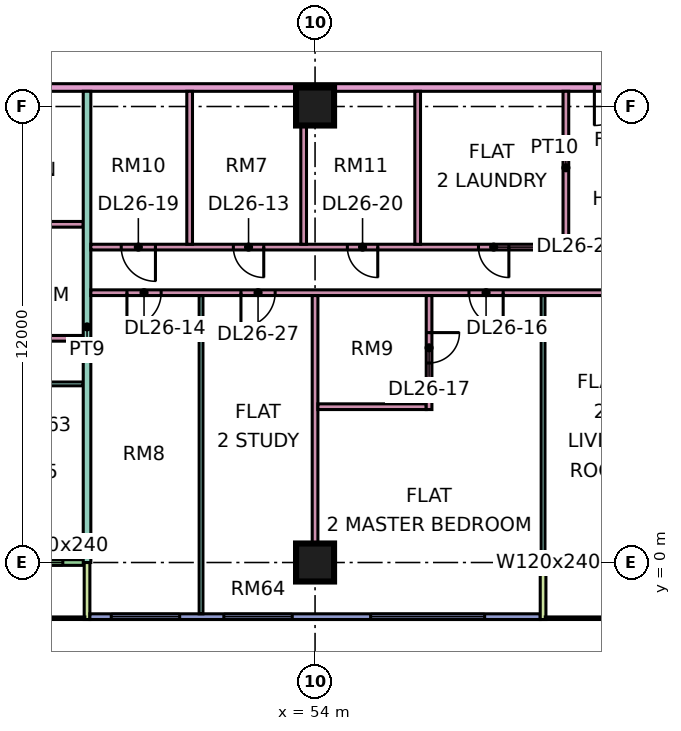
"""IFC4 building model, lengths in metres.
Left out: names, types, materials, properties, quantities, classifications, styles, units other than length and angle.
Written with IfcOpenShell. Run it as: python <this file> out.ifc"""

import sys

from ifc_helpers import new_model, si_unit, direction, frame, frame_2d, origin, origin_2d, place, context, subcontext, project, spatial, rectangle, extrude, element, fill, save


model = new_model("IFC4")
c1 = context("Model", 3, precision=1e-05, world=origin(), true_north=direction((0.0, 1.0)))
c2 = subcontext(c1, "Body", "Model", "MODEL_VIEW")
j1 = project(units=[si_unit("LENGTHUNIT", "METRE"), si_unit("PLANEANGLEUNIT", "RADIAN")], contexts=[c1])
p1 = place(None, origin())
s1 = spatial("IfcSite", under=j1, at=p1, CompositionType="ELEMENT")
p2 = place(p1, origin())
s2 = spatial("IfcBuilding", under=s1, at=p2, CompositionType="ELEMENT")
p3 = place(p2, frame((0.0, 0.0, 114.4)))
s3 = spatial("IfcBuildingStorey", under=s2, at=p3, CompositionType="ELEMENT", Elevation=114.4)
for number, where, z_axis, x_axis in (
    (1, (54.0, 0.0, 0.0), (0.0, 0.0, 1.0), (1.0, 0.0, 0.0)),
    (2, (54.0, 12.0, 0.0), (0.0, 0.0, 1.0), (1.0, 0.0, 0.0)),
):
    element("IfcColumn", number, at=place(p3, frame(where, z_axis=z_axis, x_axis=x_axis)), inside=s3, PredefinedType="COLUMN", context=c2, shape_type="SweptSolid", body=[
        extrude(rectangle(XDim=1.0, YDim=1.0, at=origin_2d()), origin(), (0.0, 0.0, 1.0), 3.75),
    ])
p4 = place(p3, frame((36.075, 0.0, 0.0), z_axis=(0.0, 0.0, 1.0), x_axis=(1.0, 0.0, 0.0)))
e3 = element("IfcWall", 3, at=p4, inside=s3, PredefinedType="SOLIDWALL", context=c2, shape_type="SweptSolid", body=[
    extrude(rectangle(XDim=11.85, YDim=0.15, at=frame_2d((5.925, 0.0))), origin(), (0.0, 0.0, 1.0), 3.35),
])
p5 = place(p4, frame((3.525, 0.0, 0.0)))
e4 = element("IfcOpeningElement", 4, at=p5, cuts=e3, PredefinedType="OPENING", context=c2, shape_type="SweptSolid", body=[
    extrude(rectangle(XDim=1.8, YDim=2.4, at=frame_2d((0.9, 1.2))), frame((0.0, 0.085, 0.0), z_axis=(0.0, -1.0, 0.0), x_axis=(1.0, 0.0, 0.0)), (0.0, 0.0, 1.0), 0.17),
])
p6 = place(p4, frame((10.087, 0.0, 0.45)))
e5 = element("IfcOpeningElement", 5, at=p6, cuts=e3, PredefinedType="OPENING", context=c2, shape_type="SweptSolid", body=[
    extrude(rectangle(XDim=1.2, YDim=2.4, at=frame_2d((0.6, 1.2))), frame((0.0, 0.085, 0.0), z_axis=(0.0, -1.0, 0.0), x_axis=(1.0, 0.0, 0.0)), (0.0, 0.0, 1.0), 0.17),
])
p7 = place(p3, frame((48.0, -1.5, 0.0), z_axis=(0.0, 0.0, 1.0), x_axis=(0.0, 1.0, 0.0)))
e6 = element("IfcWall", 6, at=p7, inside=s3, PredefinedType="SOLIDWALL", context=c2, shape_type="SweptSolid", body=[
    extrude(rectangle(XDim=1.5, YDim=0.15, at=frame_2d((0.75, 0.0))), origin(), (0.0, 0.0, 1.0), 3.35),
])
p8 = place(p3, frame((48.075, -1.425, 0.0), z_axis=(0.0, 0.0, 1.0), x_axis=(1.0, 0.0, 0.0)))
e7 = element("IfcWall", 7, at=p8, inside=s3, PredefinedType="SOLIDWALL", context=c2, shape_type="SweptSolid", body=[
    extrude(rectangle(XDim=11.85, YDim=0.15, at=frame_2d((5.925, 0.0))), origin(), (0.0, 0.0, 1.0), 3.35),
])
p9 = place(p8, frame((0.562, 0.0, 0.45)))
e8 = element("IfcOpeningElement", 8, at=p9, cuts=e7, PredefinedType="OPENING", context=c2, shape_type="SweptSolid", body=[
    extrude(rectangle(XDim=1.8, YDim=2.4, at=frame_2d((0.9, 1.2))), frame((0.0, 0.085, 0.0), z_axis=(0.0, -1.0, 0.0), x_axis=(1.0, 0.0, 0.0)), (0.0, 0.0, 1.0), 0.17),
])
p10 = place(p8, frame((3.525, 0.0, 0.45)))
e9 = element("IfcOpeningElement", 9, at=p10, cuts=e7, PredefinedType="OPENING", context=c2, shape_type="SweptSolid", body=[
    extrude(rectangle(XDim=1.8, YDim=2.4, at=frame_2d((0.9, 1.2))), frame((0.0, 0.085, 0.0), z_axis=(0.0, -1.0, 0.0), x_axis=(1.0, 0.0, 0.0)), (0.0, 0.0, 1.0), 0.17),
])
p11 = place(p8, frame((7.387, 0.0, 0.45)))
e10 = element("IfcOpeningElement", 10, at=p11, cuts=e7, PredefinedType="OPENING", context=c2, shape_type="SweptSolid", body=[
    extrude(rectangle(XDim=3.0, YDim=2.4, at=frame_2d((1.5, 1.2))), frame((0.0, 0.085, 0.0), z_axis=(0.0, -1.0, 0.0), x_axis=(1.0, 0.0, 0.0)), (0.0, 0.0, 1.0), 0.17),
])
p12 = place(p3, frame((60.075, 0.0, 0.0), z_axis=(0.0, 0.0, 1.0), x_axis=(1.0, 0.0, 0.0)))
e11 = element("IfcWall", 11, at=p12, inside=s3, PredefinedType="SOLIDWALL", context=c2, shape_type="SweptSolid", body=[
    extrude(rectangle(XDim=10.35, YDim=0.15, at=frame_2d((5.175, 0.0))), origin(), (0.0, 0.0, 1.0), 3.35),
])
p13 = place(p12, frame((0.562, 0.0, 0.45)))
e12 = element("IfcOpeningElement", 12, at=p13, cuts=e11, PredefinedType="OPENING", context=c2, shape_type="SweptSolid", body=[
    extrude(rectangle(XDim=1.2, YDim=2.4, at=frame_2d((0.6, 1.2))), frame((0.0, 0.085, 0.0), z_axis=(0.0, -1.0, 0.0), x_axis=(1.0, 0.0, 0.0)), (0.0, 0.0, 1.0), 0.17),
])
p14 = place(p12, frame((4.125, 0.0, 0.0)))
e13 = element("IfcOpeningElement", 13, at=p14, cuts=e11, PredefinedType="OPENING", context=c2, shape_type="SweptSolid", body=[
    extrude(rectangle(XDim=1.2, YDim=2.4, at=frame_2d((0.6, 1.2))), frame((0.0, 0.085, 0.0), z_axis=(0.0, -1.0, 0.0), x_axis=(1.0, 0.0, 0.0)), (0.0, 0.0, 1.0), 0.17),
])
p15 = place(p12, frame((6.525, 0.0, 0.45)))
e14 = element("IfcOpeningElement", 14, at=p15, cuts=e11, PredefinedType="OPENING", context=c2, shape_type="SweptSolid", body=[
    extrude(rectangle(XDim=1.8, YDim=2.4, at=frame_2d((0.9, 1.2))), frame((0.0, 0.085, 0.0), z_axis=(0.0, -1.0, 0.0), x_axis=(1.0, 0.0, 0.0)), (0.0, 0.0, 1.0), 0.17),
])
p16 = place(p12, frame((9.188, 0.0, 0.45)))
e15 = element("IfcOpeningElement", 15, at=p16, cuts=e11, PredefinedType="OPENING", context=c2, shape_type="SweptSolid", body=[
    extrude(rectangle(XDim=0.9, YDim=2.4, at=frame_2d((0.45, 1.2))), frame((0.0, 0.085, 0.0), z_axis=(0.0, -1.0, 0.0), x_axis=(1.0, 0.0, 0.0)), (0.0, 0.0, 1.0), 0.17),
])
p17 = place(p3, frame((60.0, -1.5, 0.0), z_axis=(0.0, 0.0, 1.0), x_axis=(0.0, 1.0, 0.0)))
e16 = element("IfcWall", 16, at=p17, inside=s3, PredefinedType="SOLIDWALL", context=c2, shape_type="SweptSolid", body=[
    extrude(rectangle(XDim=1.5, YDim=0.15, at=frame_2d((0.75, 0.0))), origin(), (0.0, 0.0, 1.0), 3.35),
])
p18 = place(p3, frame((33.05, 4.7, 0.0), z_axis=(0.0, 0.0, 1.0), x_axis=(1.0, 0.0, 0.0)))
e17 = element("IfcWall", 17, at=p18, inside=s3, PredefinedType="PARTITIONING", context=c2, shape_type="SweptSolid", body=[
    extrude(rectangle(XDim=14.85, YDim=0.1, at=frame_2d((7.425, 0.0))), origin(), (0.0, 0.0, 1.0), 3.35),
])
p19 = place(p18, frame((1.0, 0.0, 0.0)))
e18 = element("IfcOpeningElement", 18, at=p19, cuts=e17, PredefinedType="OPENING", context=c2, shape_type="SweptSolid", body=[
    extrude(rectangle(XDim=0.9, YDim=2.1, at=frame_2d((0.45, 1.05))), frame((0.0, 0.06, 0.0), z_axis=(0.0, -1.0, 0.0), x_axis=(1.0, 0.0, 0.0)), (0.0, 0.0, 1.0), 0.12),
])
p20 = place(p18, frame((13.0, 0.0, 0.0)))
e19 = element("IfcOpeningElement", 19, at=p20, cuts=e17, PredefinedType="OPENING", context=c2, shape_type="SweptSolid", body=[
    extrude(rectangle(XDim=0.9, YDim=2.1, at=frame_2d((0.45, 1.05))), frame((0.0, 0.06, 0.0), z_axis=(0.0, -1.0, 0.0), x_axis=(1.0, 0.0, 0.0)), (0.0, 0.0, 1.0), 0.12),
])
p21 = place(p18, frame((7.0, 0.0, 0.0)))
e20 = element("IfcOpeningElement", 20, at=p21, cuts=e17, PredefinedType="OPENING", context=c2, shape_type="SweptSolid", body=[
    extrude(rectangle(XDim=0.9, YDim=2.1, at=frame_2d((0.45, 1.05))), frame((0.0, 0.06, 0.0), z_axis=(0.0, -1.0, 0.0), x_axis=(1.0, 0.0, 0.0)), (0.0, 0.0, 1.0), 0.12),
])
p22 = place(p3, frame((40.65, 12.5, 0.0), z_axis=(0.0, 0.0, 1.0), x_axis=(1.0, 0.0, 0.0)))
e21 = element("IfcWall", 21, at=p22, inside=s3, PredefinedType="PARTITIONING", context=c2, shape_type="SweptSolid", body=[
    extrude(rectangle(XDim=31.276, YDim=0.2, at=frame_2d((15.638, 0.0))), origin(), (0.0, 0.0, 1.0), 3.35),
])
p23 = place(p22, frame((20.7, 0.0, 0.0)))
e22 = element("IfcOpeningElement", 22, at=p23, cuts=e21, PredefinedType="OPENING", context=c2, shape_type="SweptSolid", body=[
    extrude(rectangle(XDim=1.0, YDim=2.1, at=frame_2d((0.5, 1.05))), frame((0.0, 0.11, 0.0), z_axis=(0.0, -1.0, 0.0), x_axis=(1.0, 0.0, 0.0)), (0.0, 0.0, 1.0), 0.22),
])
p24 = place(p22, frame((1.05, 0.0, 0.0)))
e23 = element("IfcOpeningElement", 23, at=p24, cuts=e21, PredefinedType="OPENING", context=c2, shape_type="SweptSolid", body=[
    extrude(rectangle(XDim=1.0, YDim=2.1, at=frame_2d((0.5, 1.05))), frame((0.0, 0.11, 0.0), z_axis=(0.0, -1.0, 0.0), x_axis=(1.0, 0.0, 0.0)), (0.0, 0.0, 1.0), 0.22),
])
p25 = place(p3, frame((43.725, 5.9, 0.0), z_axis=(0.0, 0.0, 1.0), x_axis=(1.0, 0.0, 0.0)))
e24 = element("IfcWall", 24, at=p25, inside=s3, PredefinedType="PARTITIONING", context=c2, shape_type="SweptSolid", body=[
    extrude(rectangle(XDim=4.175, YDim=0.15, at=frame_2d((2.087, 0.0))), origin(), (0.0, 0.0, 1.0), 3.35),
])
p26 = place(p25, frame((1.675, 0.0, 0.0)))
e25 = element("IfcOpeningElement", 25, at=p26, cuts=e24, PredefinedType="OPENING", context=c2, shape_type="SweptSolid", body=[
    extrude(rectangle(XDim=0.8, YDim=2.1, at=frame_2d((0.4, 1.05))), frame((0.0, 0.085, 0.0), z_axis=(0.0, -1.0, 0.0), x_axis=(1.0, 0.0, 0.0)), (0.0, 0.0, 1.0), 0.17),
])
p27 = place(p3, frame((43.725, 8.9, 0.0), z_axis=(0.0, 0.0, 1.0), x_axis=(1.0, 0.0, 0.0)))
e26 = element("IfcWall", 26, at=p27, inside=s3, PredefinedType="PARTITIONING", context=c2, shape_type="SweptSolid", body=[
    extrude(rectangle(XDim=4.175, YDim=0.15, at=frame_2d((2.087, 0.0))), origin(), (0.0, 0.0, 1.0), 3.35),
])
p28 = place(p3, frame((48.0, 0.0, 0.0), z_axis=(0.0, 0.0, 1.0), x_axis=(0.0, 1.0, 0.0)))
e27 = element("IfcWall", 27, at=p28, inside=s3, PredefinedType="PARTITIONING", context=c2, shape_type="SweptSolid", body=[
    extrude(rectangle(XDim=12.4, YDim=0.2, at=frame_2d((6.2, 0.0))), origin(), (0.0, 0.0, 1.0), 3.35),
])
p29 = place(p3, frame((48.1, 7.1, 0.0), z_axis=(0.0, 0.0, 1.0), x_axis=(1.0, 0.0, 0.0)))
e28 = element("IfcWall", 28, at=p29, inside=s3, PredefinedType="PARTITIONING", context=c2, shape_type="SweptSolid", body=[
    extrude(rectangle(XDim=25.25, YDim=0.15, at=frame_2d((12.625, 0.0))), origin(), (0.0, 0.0, 1.0), 3.35),
])
p30 = place(p29, frame((0.95, 0.0, 0.0)))
e29 = element("IfcOpeningElement", 29, at=p30, cuts=e28, PredefinedType="OPENING", context=c2, shape_type="SweptSolid", body=[
    extrude(rectangle(XDim=0.9, YDim=2.1, at=frame_2d((0.45, 1.05))), frame((0.0, 0.085, 0.0), z_axis=(0.0, -1.0, 0.0), x_axis=(1.0, 0.0, 0.0)), (0.0, 0.0, 1.0), 0.17),
])
p31 = place(p29, frame((21.95, 0.0, 0.0)))
e30 = element("IfcOpeningElement", 30, at=p31, cuts=e28, PredefinedType="OPENING", context=c2, shape_type="SweptSolid", body=[
    extrude(rectangle(XDim=0.9, YDim=2.1, at=frame_2d((0.45, 1.05))), frame((0.0, 0.085, 0.0), z_axis=(0.0, -1.0, 0.0), x_axis=(1.0, 0.0, 0.0)), (0.0, 0.0, 1.0), 0.17),
])
p32 = place(p29, frame((9.95, 0.0, 0.0)))
e31 = element("IfcOpeningElement", 31, at=p32, cuts=e28, PredefinedType="OPENING", context=c2, shape_type="SweptSolid", body=[
    extrude(rectangle(XDim=0.9, YDim=2.1, at=frame_2d((0.45, 1.05))), frame((0.0, 0.085, 0.0), z_axis=(0.0, -1.0, 0.0), x_axis=(1.0, 0.0, 0.0)), (0.0, 0.0, 1.0), 0.17),
])
p33 = place(p29, frame((14.45, 0.0, 0.0)))
e32 = element("IfcOpeningElement", 32, at=p33, cuts=e28, PredefinedType="OPENING", context=c2, shape_type="SweptSolid", body=[
    extrude(rectangle(XDim=0.9, YDim=2.1, at=frame_2d((0.45, 1.05))), frame((0.0, 0.085, 0.0), z_axis=(0.0, -1.0, 0.0), x_axis=(1.0, 0.0, 0.0)), (0.0, 0.0, 1.0), 0.17),
])
p34 = place(p29, frame((19.8, 0.0, 0.0)))
e33 = element("IfcOpeningElement", 33, at=p34, cuts=e28, PredefinedType="OPENING", context=c2, shape_type="SweptSolid", body=[
    extrude(rectangle(XDim=0.8, YDim=2.1, at=frame_2d((0.4, 1.05))), frame((0.0, 0.085, 0.0), z_axis=(0.0, -1.0, 0.0), x_axis=(1.0, 0.0, 0.0)), (0.0, 0.0, 1.0), 0.17),
])
p35 = place(p29, frame((3.95, 0.0, 0.0)))
e34 = element("IfcOpeningElement", 34, at=p35, cuts=e28, PredefinedType="OPENING", context=c2, shape_type="SweptSolid", body=[
    extrude(rectangle(XDim=0.9, YDim=2.1, at=frame_2d((0.45, 1.05))), frame((0.0, 0.085, 0.0), z_axis=(0.0, -1.0, 0.0), x_axis=(1.0, 0.0, 0.0)), (0.0, 0.0, 1.0), 0.17),
])
p36 = place(p3, frame((48.1, 8.3, 0.0), z_axis=(0.0, 0.0, 1.0), x_axis=(1.0, 0.0, 0.0)))
e35 = element("IfcWall", 35, at=p36, inside=s3, PredefinedType="PARTITIONING", context=c2, shape_type="SweptSolid", body=[
    extrude(rectangle(XDim=12.575, YDim=0.15, at=frame_2d((6.288, 0.0))), origin(), (0.0, 0.0, 1.0), 3.35),
])
p37 = place(p36, frame((3.75, 0.0, 0.0)))
e36 = element("IfcOpeningElement", 36, at=p37, cuts=e35, PredefinedType="OPENING", context=c2, shape_type="SweptSolid", body=[
    extrude(rectangle(XDim=0.8, YDim=2.1, at=frame_2d((0.4, 1.05))), frame((0.0, 0.085, 0.0), z_axis=(0.0, -1.0, 0.0), x_axis=(1.0, 0.0, 0.0)), (0.0, 0.0, 1.0), 0.17),
])
p38 = place(p36, frame((0.8, 0.0, 0.0)))
e37 = element("IfcOpeningElement", 37, at=p38, cuts=e35, PredefinedType="OPENING", context=c2, shape_type="SweptSolid", body=[
    extrude(rectangle(XDim=0.9, YDim=2.1, at=frame_2d((0.45, 1.05))), frame((0.0, 0.085, 0.0), z_axis=(0.0, -1.0, 0.0), x_axis=(1.0, 0.0, 0.0)), (0.0, 0.0, 1.0), 0.17),
])
p39 = place(p36, frame((6.75, 0.0, 0.0)))
e38 = element("IfcOpeningElement", 38, at=p39, cuts=e35, PredefinedType="OPENING", context=c2, shape_type="SweptSolid", body=[
    extrude(rectangle(XDim=0.8, YDim=2.1, at=frame_2d((0.4, 1.05))), frame((0.0, 0.085, 0.0), z_axis=(0.0, -1.0, 0.0), x_axis=(1.0, 0.0, 0.0)), (0.0, 0.0, 1.0), 0.17),
])
p40 = place(p36, frame((10.2, 0.0, 0.0)))
e39 = element("IfcOpeningElement", 39, at=p40, cuts=e35, PredefinedType="OPENING", context=c2, shape_type="SweptSolid", body=[
    extrude(rectangle(XDim=0.8, YDim=2.1, at=frame_2d((0.4, 1.05))), frame((0.0, 0.085, 0.0), z_axis=(0.0, -1.0, 0.0), x_axis=(1.0, 0.0, 0.0)), (0.0, 0.0, 1.0), 0.17),
])
p41 = place(p3, frame((50.7, 8.375, 0.0), z_axis=(0.0, 0.0, 1.0), x_axis=(0.0, 1.0, 0.0)))
e40 = element("IfcWall", 40, at=p41, inside=s3, PredefinedType="PARTITIONING", context=c2, shape_type="SweptSolid", body=[
    extrude(rectangle(XDim=4.025, YDim=0.15, at=frame_2d((2.012, 0.0))), origin(), (0.0, 0.0, 1.0), 3.35),
])
p42 = place(p3, frame((51.0, -1.35, 0.0), z_axis=(0.0, 0.0, 1.0), x_axis=(0.0, 1.0, 0.0)))
e41 = element("IfcWall", 41, at=p42, inside=s3, PredefinedType="PARTITIONING", context=c2, shape_type="SweptSolid", body=[
    extrude(rectangle(XDim=8.375, YDim=0.1, at=frame_2d((4.188, 0.0))), origin(), (0.0, 0.0, 1.0), 3.35),
])
p43 = place(p3, frame((53.7, 8.375, 0.0), z_axis=(0.0, 0.0, 1.0), x_axis=(0.0, 1.0, 0.0)))
e42 = element("IfcWall", 42, at=p43, inside=s3, PredefinedType="PARTITIONING", context=c2, shape_type="SweptSolid", body=[
    extrude(rectangle(XDim=4.025, YDim=0.15, at=frame_2d((2.012, 0.0))), origin(), (0.0, 0.0, 1.0), 3.35),
])
p44 = place(p3, frame((54.0, 0.0, 0.0), z_axis=(0.0, 0.0, 1.0), x_axis=(0.0, 1.0, 0.0)))
e43 = element("IfcWall", 43, at=p44, inside=s3, PredefinedType="PARTITIONING", context=c2, shape_type="SweptSolid", body=[
    extrude(rectangle(XDim=7.025, YDim=0.15, at=frame_2d((3.512, 0.0))), origin(), (0.0, 0.0, 1.0), 3.35),
])
p45 = place(p3, frame((54.075, 4.1, 0.0), z_axis=(0.0, 0.0, 1.0), x_axis=(1.0, 0.0, 0.0)))
e44 = element("IfcWall", 44, at=p45, inside=s3, PredefinedType="PARTITIONING", context=c2, shape_type="SweptSolid", body=[
    extrude(rectangle(XDim=2.85, YDim=0.15, at=frame_2d((1.425, 0.0))), origin(), (0.0, 0.0, 1.0), 3.35),
])
p46 = place(p3, frame((56.7, 8.375, 0.0), z_axis=(0.0, 0.0, 1.0), x_axis=(0.0, 1.0, 0.0)))
e45 = element("IfcWall", 45, at=p46, inside=s3, PredefinedType="PARTITIONING", context=c2, shape_type="SweptSolid", body=[
    extrude(rectangle(XDim=4.025, YDim=0.15, at=frame_2d((2.012, 0.0))), origin(), (0.0, 0.0, 1.0), 3.35),
])
p47 = place(p3, frame((57.0, 4.025, 0.0), z_axis=(0.0, 0.0, 1.0), x_axis=(0.0, 1.0, 0.0)))
e46 = element("IfcWall", 46, at=p47, inside=s3, PredefinedType="PARTITIONING", context=c2, shape_type="SweptSolid", body=[
    extrude(rectangle(XDim=3.0, YDim=0.15, at=frame_2d((1.5, 0.0))), origin(), (0.0, 0.0, 1.0), 3.35),
])
p48 = place(p47, frame((1.225, 0.0, 0.0)))
e47 = element("IfcOpeningElement", 47, at=p48, cuts=e46, PredefinedType="OPENING", context=c2, shape_type="SweptSolid", body=[
    extrude(rectangle(XDim=0.8, YDim=2.1, at=frame_2d((0.4, 1.05))), frame((0.0, 0.085, 0.0), z_axis=(0.0, -1.0, 0.0), x_axis=(1.0, 0.0, 0.0)), (0.0, 0.0, 1.0), 0.17),
])
p49 = place(p3, frame((60.0, 0.0, 0.0), z_axis=(0.0, 0.0, 1.0), x_axis=(0.0, 1.0, 0.0)))
e48 = element("IfcWall", 48, at=p49, inside=s3, PredefinedType="PARTITIONING", context=c2, shape_type="SweptSolid", body=[
    extrude(rectangle(XDim=7.025, YDim=0.1, at=frame_2d((3.512, 0.0))), origin(), (0.0, 0.0, 1.0), 3.35),
])
p50 = place(p3, frame((60.6, 8.375, 0.0), z_axis=(0.0, 0.0, 1.0), x_axis=(0.0, 1.0, 0.0)))
e49 = element("IfcWall", 49, at=p50, inside=s3, PredefinedType="PARTITIONING", context=c2, shape_type="SweptSolid", body=[
    extrude(rectangle(XDim=4.025, YDim=0.15, at=frame_2d((2.012, 0.0))), origin(), (0.0, 0.0, 1.0), 3.35),
])
p51 = place(p6, origin())
e50 = element("IfcWindow", 50, at=p51, inside=s3, PartitioningType="SINGLE_PANEL", PredefinedType="WINDOW", context=c2, shape_type="SweptSolid", body=[
    extrude(rectangle(XDim=1.2, YDim=2.4, at=frame_2d((0.6, 1.2))), frame((0.0, 0.03, 0.0), z_axis=(0.0, -1.0, 0.0), x_axis=(1.0, 0.0, 0.0)), (0.0, 0.0, 1.0), 0.06),
])
fill(e5, e50)
p52 = place(p9, origin())
e51 = element("IfcWindow", 51, at=p52, inside=s3, PartitioningType="SINGLE_PANEL", PredefinedType="WINDOW", context=c2, shape_type="SweptSolid", body=[
    extrude(rectangle(XDim=1.8, YDim=2.4, at=frame_2d((0.9, 1.2))), frame((0.0, 0.03, 0.0), z_axis=(0.0, -1.0, 0.0), x_axis=(1.0, 0.0, 0.0)), (0.0, 0.0, 1.0), 0.06),
])
fill(e8, e51)
p53 = place(p10, origin())
e52 = element("IfcWindow", 52, at=p53, inside=s3, PartitioningType="SINGLE_PANEL", PredefinedType="WINDOW", context=c2, shape_type="SweptSolid", body=[
    extrude(rectangle(XDim=1.8, YDim=2.4, at=frame_2d((0.9, 1.2))), frame((0.0, 0.03, 0.0), z_axis=(0.0, -1.0, 0.0), x_axis=(1.0, 0.0, 0.0)), (0.0, 0.0, 1.0), 0.06),
])
fill(e9, e52)
p54 = place(p11, origin())
e53 = element("IfcWindow", 53, at=p54, inside=s3, PartitioningType="SINGLE_PANEL", PredefinedType="WINDOW", context=c2, shape_type="SweptSolid", body=[
    extrude(rectangle(XDim=3.0, YDim=2.4, at=frame_2d((1.5, 1.2))), frame((0.0, 0.03, 0.0), z_axis=(0.0, -1.0, 0.0), x_axis=(1.0, 0.0, 0.0)), (0.0, 0.0, 1.0), 0.06),
])
fill(e10, e53)
p55 = place(p13, origin())
e54 = element("IfcWindow", 54, at=p55, inside=s3, PartitioningType="SINGLE_PANEL", PredefinedType="WINDOW", context=c2, shape_type="SweptSolid", body=[
    extrude(rectangle(XDim=1.2, YDim=2.4, at=frame_2d((0.6, 1.2))), frame((0.0, 0.03, 0.0), z_axis=(0.0, -1.0, 0.0), x_axis=(1.0, 0.0, 0.0)), (0.0, 0.0, 1.0), 0.06),
])
fill(e12, e54)
p56 = place(p37, origin())
e55 = element("IfcDoor", 55, at=p56, inside=s3, OperationType="SINGLE_SWING_RIGHT", PredefinedType="DOOR", context=c2, shape_type="SweptSolid", body=[
    extrude(rectangle(XDim=0.8, YDim=2.1, at=frame_2d((0.4, 1.05))), frame((0.0, 0.025, 0.0), z_axis=(0.0, -1.0, 0.0), x_axis=(1.0, 0.0, 0.0)), (0.0, 0.0, 1.0), 0.05),
])
fill(e36, e55)
p57 = place(p30, frame((0.9, 0.0, 0.0), z_axis=(0.0, 0.0, 1.0), x_axis=(-1.0, 0.0, 0.0)))
e56 = element("IfcDoor", 56, at=p57, inside=s3, OperationType="SINGLE_SWING_LEFT", PredefinedType="DOOR", context=c2, shape_type="SweptSolid", body=[
    extrude(rectangle(XDim=0.9, YDim=2.1, at=frame_2d((0.45, 1.05))), frame((0.0, 0.025, 0.0), z_axis=(0.0, -1.0, 0.0), x_axis=(1.0, 0.0, 0.0)), (0.0, 0.0, 1.0), 0.05),
])
fill(e29, e56)
p58 = place(p32, origin())
e57 = element("IfcDoor", 57, at=p58, inside=s3, OperationType="SINGLE_SWING_RIGHT", PredefinedType="DOOR", context=c2, shape_type="SweptSolid", body=[
    extrude(rectangle(XDim=0.9, YDim=2.1, at=frame_2d((0.45, 1.05))), frame((0.0, 0.025, 0.0), z_axis=(0.0, -1.0, 0.0), x_axis=(1.0, 0.0, 0.0)), (0.0, 0.0, 1.0), 0.05),
])
fill(e31, e57)
p59 = place(p48, origin())
e58 = element("IfcDoor", 58, at=p59, inside=s3, OperationType="SINGLE_SWING_RIGHT", PredefinedType="DOOR", context=c2, shape_type="SweptSolid", body=[
    extrude(rectangle(XDim=0.8, YDim=2.1, at=frame_2d((0.4, 1.05))), frame((0.0, 0.025, 0.0), z_axis=(0.0, -1.0, 0.0), x_axis=(1.0, 0.0, 0.0)), (0.0, 0.0, 1.0), 0.05),
])
fill(e47, e58)
p60 = place(p23, frame((1.0, 0.0, 0.0), z_axis=(0.0, 0.0, 1.0), x_axis=(-1.0, 0.0, 0.0)))
e59 = element("IfcDoor", 59, at=p60, inside=s3, OperationType="SINGLE_SWING_LEFT", PredefinedType="DOOR", context=c2, shape_type="SweptSolid", body=[
    extrude(rectangle(XDim=1.0, YDim=2.1, at=frame_2d((0.5, 1.05))), frame((0.0, 0.025, 0.0), z_axis=(0.0, -1.0, 0.0), x_axis=(1.0, 0.0, 0.0)), (0.0, 0.0, 1.0), 0.05),
])
fill(e22, e59)
p61 = place(p38, origin())
e60 = element("IfcDoor", 60, at=p61, inside=s3, OperationType="SINGLE_SWING_RIGHT", PredefinedType="DOOR", context=c2, shape_type="SweptSolid", body=[
    extrude(rectangle(XDim=0.9, YDim=2.1, at=frame_2d((0.45, 1.05))), frame((0.0, 0.025, 0.0), z_axis=(0.0, -1.0, 0.0), x_axis=(1.0, 0.0, 0.0)), (0.0, 0.0, 1.0), 0.05),
])
fill(e37, e60)
p62 = place(p39, origin())
e61 = element("IfcDoor", 61, at=p62, inside=s3, OperationType="SINGLE_SWING_RIGHT", PredefinedType="DOOR", context=c2, shape_type="SweptSolid", body=[
    extrude(rectangle(XDim=0.8, YDim=2.1, at=frame_2d((0.4, 1.05))), frame((0.0, 0.025, 0.0), z_axis=(0.0, -1.0, 0.0), x_axis=(1.0, 0.0, 0.0)), (0.0, 0.0, 1.0), 0.05),
])
fill(e38, e61)
p63 = place(p40, origin())
e62 = element("IfcDoor", 62, at=p63, inside=s3, OperationType="SINGLE_SWING_RIGHT", PredefinedType="DOOR", context=c2, shape_type="SweptSolid", body=[
    extrude(rectangle(XDim=0.8, YDim=2.1, at=frame_2d((0.4, 1.05))), frame((0.0, 0.025, 0.0), z_axis=(0.0, -1.0, 0.0), x_axis=(1.0, 0.0, 0.0)), (0.0, 0.0, 1.0), 0.05),
])
fill(e39, e62)
p64 = place(p35, frame((0.9, 0.0, 0.0), z_axis=(0.0, 0.0, 1.0), x_axis=(-1.0, 0.0, 0.0)))
e63 = element("IfcDoor", 63, at=p64, inside=s3, OperationType="SINGLE_SWING_LEFT", PredefinedType="DOOR", context=c2, shape_type="SweptSolid", body=[
    extrude(rectangle(XDim=0.9, YDim=2.1, at=frame_2d((0.45, 1.05))), frame((0.0, 0.025, 0.0), z_axis=(0.0, -1.0, 0.0), x_axis=(1.0, 0.0, 0.0)), (0.0, 0.0, 1.0), 0.05),
])
fill(e34, e63)
save(model, sys.argv[1])
